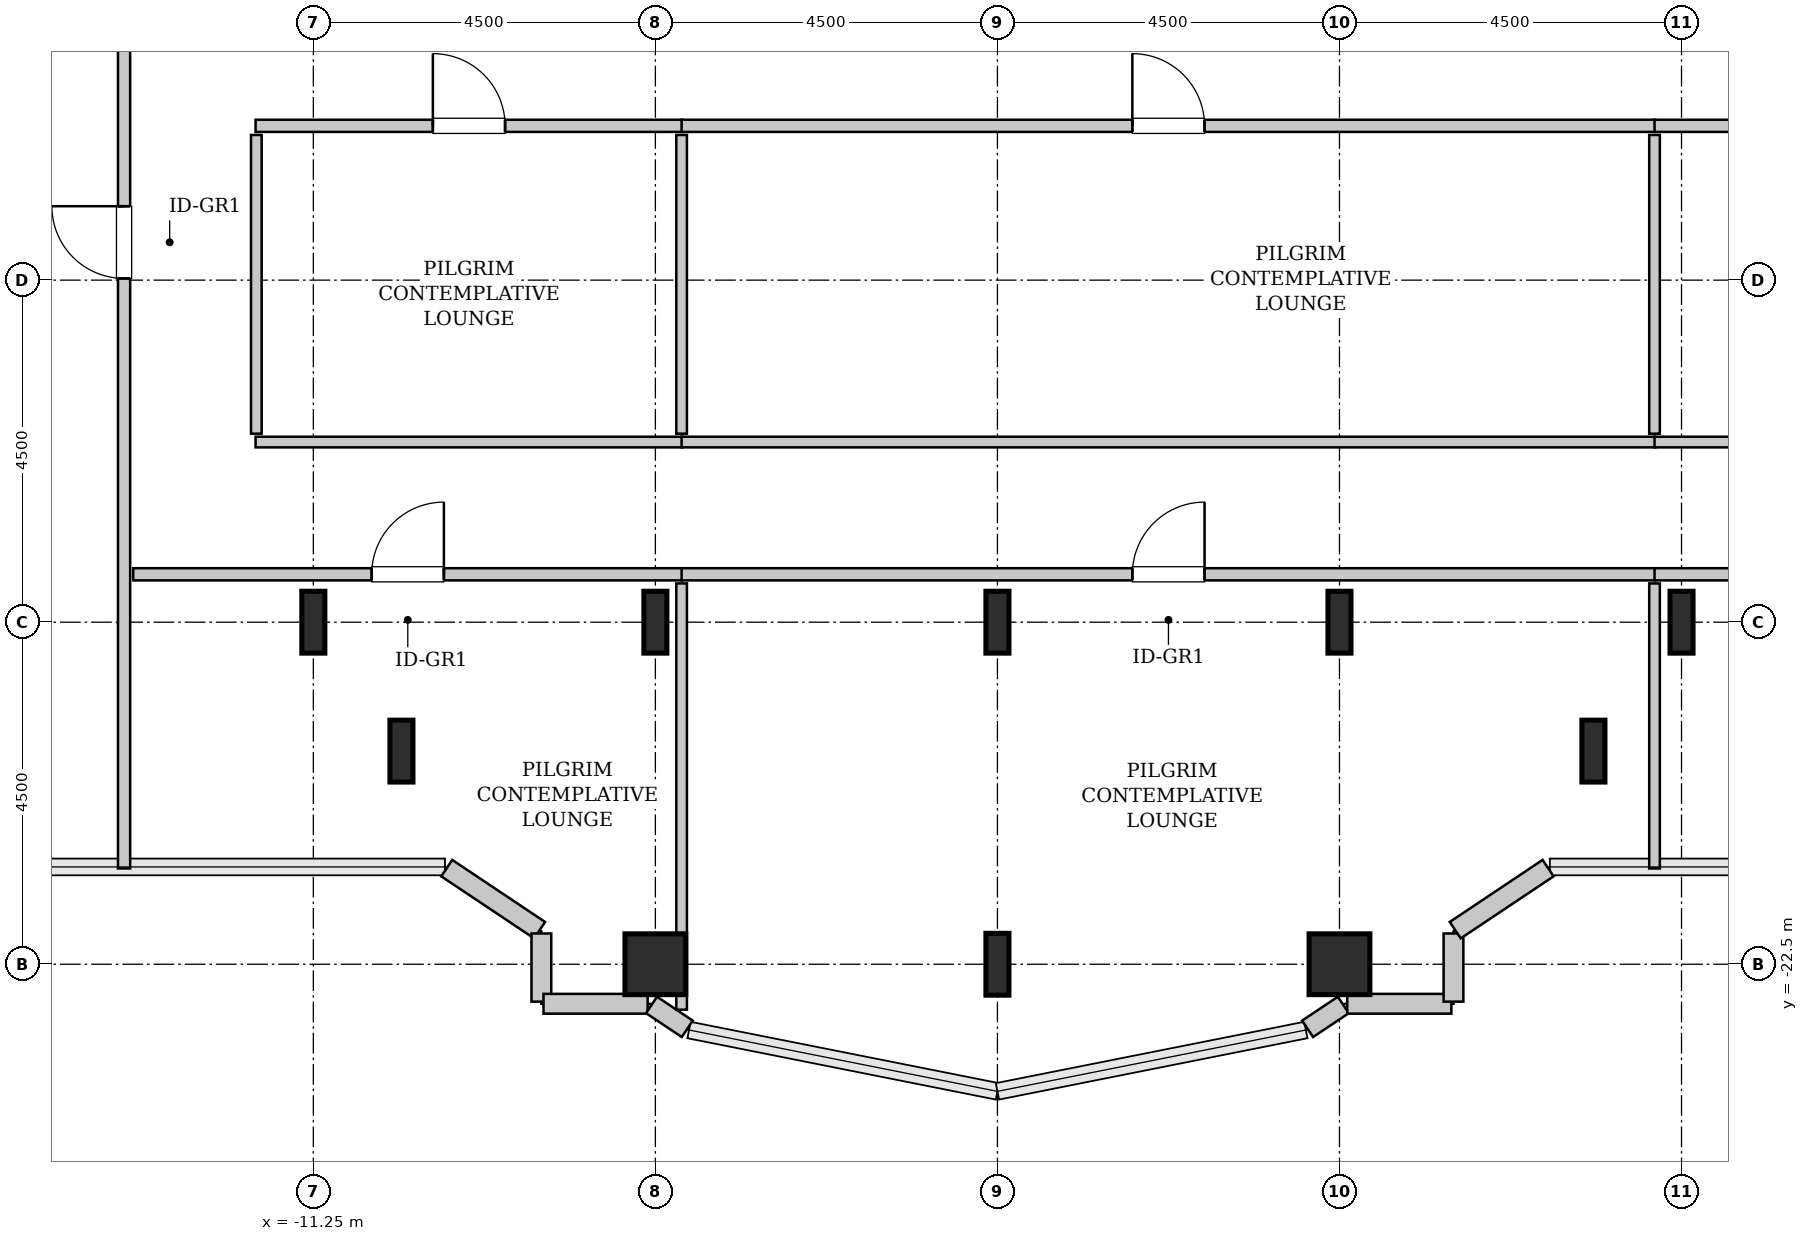
"""IFC4 building model, lengths in metres.
Left out: names, types, materials, properties, quantities, classifications, styles, units other than length and angle.
Written with IfcOpenShell. Run it as: python <this file> out.ifc"""

import sys

from ifc_helpers import new_model, si_unit, direction, frame, frame_2d, origin, origin_2d, place, context, subcontext, project, spatial, rectangle, hollow_rectangle, i_section, extrude, source, transform, mapped, element, fill, save


model = new_model("IFC4")
c1 = context("Model", 3, precision=1e-05, world=origin(), true_north=direction((0.0, 1.0)))
c2 = subcontext(c1, "Body", "Model", "MODEL_VIEW")
j1 = project(units=[si_unit("LENGTHUNIT", "METRE"), si_unit("PLANEANGLEUNIT", "RADIAN")], contexts=[c1])
p1 = place(None, origin())
s1 = spatial("IfcSite", under=j1, at=p1, CompositionType="ELEMENT")
p2 = place(p1, origin())
s2 = spatial("IfcBuilding", under=s1, at=p2, CompositionType="ELEMENT")
p3 = place(p2, frame((0.0, 0.0, 183.0)))
s3 = spatial("IfcBuildingStorey", under=s2, at=p3, CompositionType="ELEMENT", Elevation=183.0)
m1 = source(origin(), c2, "Body", "SweptSolid", [
    extrude(i_section(OverallWidth=0.303, OverallDepth=0.814, WebThickness=0.021, FlangeThickness=0.04, FilletRadius=0.03, at=origin_2d()), origin(), (0.0, 0.0, 1.0), 3.8),
])
for number, where, z_axis, x_axis in (
    (1, (-11.25, -18.0, 0.0), (0.0, 0.0, 1.0), (1.0, 0.0, 0.0)),
    (2, (-10.091, -19.696, 0.0), (0.0, 0.0, 1.0), (1.0, 0.0, 0.0)),
):
    element("IfcColumn", number, at=place(p3, frame(where, z_axis=z_axis, x_axis=x_axis)), inside=s3, PredefinedType="COLUMN", context=c2, shape_type="MappedRepresentation", body=[
        mapped(m1, transform((0.0, 0.0, 0.0), x_axis=(1.0, 0.0, 0.0), y_axis=(0.0, 1.0, 0.0), z_axis=(0.0, 0.0, 1.0), scale=1.0)),
    ])
m2 = source(origin(), c2, "Body", "SweptSolid", [
    extrude(hollow_rectangle(XDim=0.8, YDim=0.8, WallThickness=0.04, InnerFilletRadius=0.04, OuterFilletRadius=0.08, at=origin_2d()), origin(), (0.0, 0.0, 1.0), 3.8),
])
p4 = place(p3, frame((-6.75, -22.5, 0.0), z_axis=(0.0, 0.0, 1.0), x_axis=(1.0, 0.0, 0.0)))
e3 = element("IfcColumn", 3, at=p4, inside=s3, PredefinedType="COLUMN", context=c2, shape_type="MappedRepresentation", body=[
    mapped(m2, transform((0.0, 0.0, 0.0), x_axis=(1.0, 0.0, 0.0), y_axis=(0.0, 1.0, 0.0), z_axis=(0.0, 0.0, 1.0), scale=1.0)),
])
for number, where, z_axis, x_axis in (
    (4, (-6.75, -18.0, 0.0), (0.0, 0.0, 1.0), (1.0, 0.0, 0.0)),
    (5, (-2.25, -22.5, 0.0), (0.0, 0.0, 1.0), (1.0, 0.0, 0.0)),
    (6, (-2.25, -18.0, 0.0), (0.0, 0.0, 1.0), (1.0, 0.0, 0.0)),
):
    element("IfcColumn", number, at=place(p3, frame(where, z_axis=z_axis, x_axis=x_axis)), inside=s3, PredefinedType="COLUMN", context=c2, shape_type="MappedRepresentation", body=[
        mapped(m1, transform((0.0, 0.0, 0.0), x_axis=(1.0, 0.0, 0.0), y_axis=(0.0, 1.0, 0.0), z_axis=(0.0, 0.0, 1.0), scale=1.0)),
    ])
p5 = place(p3, frame((2.25, -22.5, 0.0), z_axis=(0.0, 0.0, 1.0), x_axis=(1.0, 0.0, 0.0)))
e7 = element("IfcColumn", 7, at=p5, inside=s3, PredefinedType="COLUMN", context=c2, shape_type="MappedRepresentation", body=[
    mapped(m2, transform((0.0, 0.0, 0.0), x_axis=(1.0, 0.0, 0.0), y_axis=(0.0, 1.0, 0.0), z_axis=(0.0, 0.0, 1.0), scale=1.0)),
])
for number, where, z_axis, x_axis in (
    (8, (2.25, -18.0, 0.0), (0.0, 0.0, 1.0), (1.0, 0.0, 0.0)),
    (9, (5.591, -19.696, 0.0), (0.0, 0.0, 1.0), (1.0, 0.0, 0.0)),
    (10, (6.75, -18.0, 0.0), (0.0, 0.0, 1.0), (1.0, 0.0, 0.0)),
):
    element("IfcColumn", number, at=place(p3, frame(where, z_axis=z_axis, x_axis=x_axis)), inside=s3, PredefinedType="COLUMN", context=c2, shape_type="MappedRepresentation", body=[
        mapped(m1, transform((0.0, 0.0, 0.0), x_axis=(1.0, 0.0, 0.0), y_axis=(0.0, 1.0, 0.0), z_axis=(0.0, 0.0, 1.0), scale=1.0)),
    ])
m3 = source(origin(), c2, "Body", "SweptSolid", [
    extrude(rectangle(XDim=1.469, YDim=0.26, at=frame_2d((0.734, 0.0))), origin(), (0.0, 0.0, 1.0), 3.55),
])
p6 = place(p3, frame((-9.495, -21.236, 0.0), z_axis=(0.0, 0.0, 1.0), x_axis=(0.831461760506, -0.555581983884, 0.0)))
e11 = element("IfcWall", 11, at=p6, inside=s3, PredefinedType="SOLIDWALL", context=c2, shape_type="MappedRepresentation", body=[
    mapped(m3, transform((0.0, 0.0, 0.0), x_axis=(1.0, 0.0, 0.0), y_axis=(0.0, 1.0, 0.0), z_axis=(0.0, 0.0, 1.0), scale=1.0)),
])
m4 = source(origin(), c2, "Body", "SweptSolid", [
    extrude(rectangle(XDim=0.897, YDim=0.26, at=frame_2d((0.448, 0.0))), origin(), (0.0, 0.0, 1.0), 3.55),
])
p7 = place(p3, frame((-8.25, -22.095, 0.0), z_axis=(0.0, 0.0, 1.0), x_axis=(0.0, -1.0, 0.0)))
e12 = element("IfcWall", 12, at=p7, inside=s3, PredefinedType="SOLIDWALL", context=c2, shape_type="MappedRepresentation", body=[
    mapped(m4, transform((0.0, 0.0, 0.0), x_axis=(1.0, 0.0, 0.0), y_axis=(0.0, 1.0, 0.0), z_axis=(0.0, 0.0, 1.0), scale=1.0)),
])
m5 = source(origin(), c2, "Body", "SweptSolid", [
    extrude(rectangle(XDim=1.37, YDim=0.26, at=frame_2d((0.685, 0.0))), origin(), (0.0, 0.0, 1.0), 3.55),
])
p8 = place(p3, frame((-8.222, -23.02, 0.0), z_axis=(0.0, 0.0, 1.0), x_axis=(1.0, 0.0, 0.0)))
e13 = element("IfcWall", 13, at=p8, inside=s3, PredefinedType="SOLIDWALL", context=c2, shape_type="MappedRepresentation", body=[
    mapped(m5, transform((0.0, 0.0, 0.0), x_axis=(1.0, 0.0, 0.0), y_axis=(0.0, 1.0, 0.0), z_axis=(0.0, 0.0, 1.0), scale=1.0)),
])
m6 = source(origin(), c2, "Body", "SweptSolid", [
    extrude(rectangle(XDim=0.565, YDim=0.26, at=frame_2d((0.283, 0.0))), origin(), (0.0, 0.0, 1.0), 3.55),
])
for number, where, z_axis, x_axis in (
    (14, (-6.801, -23.036, 0.0), (0.0, 0.0, 1.0), (0.832, -0.555, 0.0)),
    (15, (1.831, -23.35, 0.0), (0.0, 0.0, 1.0), (0.832, 0.555, 0.0)),
):
    element("IfcWall", number, at=place(p3, frame(where, z_axis=z_axis, x_axis=x_axis)), inside=s3, PredefinedType="SOLIDWALL", context=c2, shape_type="MappedRepresentation", body=[
        mapped(m6, transform((0.0, 0.0, 0.0), x_axis=(1.0, 0.0, 0.0), y_axis=(0.0, 1.0, 0.0), z_axis=(0.0, 0.0, 1.0), scale=1.0)),
    ])
p9 = place(p3, frame((2.352, -23.02, 0.0), z_axis=(0.0, 0.0, 1.0), x_axis=(1.0, 0.0, 0.0)))
e16 = element("IfcWall", 16, at=p9, inside=s3, PredefinedType="SOLIDWALL", context=c2, shape_type="MappedRepresentation", body=[
    mapped(m5, transform((0.0, 0.0, 0.0), x_axis=(1.0, 0.0, 0.0), y_axis=(0.0, 1.0, 0.0), z_axis=(0.0, 0.0, 1.0), scale=1.0)),
])
p10 = place(p3, frame((3.75, -22.992, 0.0), z_axis=(0.0, 0.0, 1.0), x_axis=(0.0, 1.0, 0.0)))
e17 = element("IfcWall", 17, at=p10, inside=s3, PredefinedType="SOLIDWALL", context=c2, shape_type="MappedRepresentation", body=[
    mapped(m4, transform((0.0, 0.0, 0.0), x_axis=(1.0, 0.0, 0.0), y_axis=(0.0, 1.0, 0.0), z_axis=(0.0, 0.0, 1.0), scale=1.0)),
])
p11 = place(p3, frame((3.773, -22.052, 0.0), z_axis=(0.0, 0.0, 1.0), x_axis=(0.831461760506, 0.555581983884, 0.0)))
e18 = element("IfcWall", 18, at=p11, inside=s3, PredefinedType="SOLIDWALL", context=c2, shape_type="MappedRepresentation", body=[
    mapped(m3, transform((0.0, 0.0, 0.0), x_axis=(1.0, 0.0, 0.0), y_axis=(0.0, 1.0, 0.0), z_axis=(0.0, 0.0, 1.0), scale=1.0)),
])
m7 = source(origin(), c2, "Body", "SweptSolid", [
    extrude(rectangle(XDim=12.645, YDim=0.16, at=frame_2d((6.323, 0.0))), origin(), (0.0, 0.0, 1.0), 3.535),
])
p12 = place(p3, frame((-13.74, -21.24, 0.0), z_axis=(0.0, 0.0, 1.0), x_axis=(0.0, 1.0, 0.0)))
e19 = element("IfcWall", 19, at=p12, inside=s3, PredefinedType="PARTITIONING", context=c2, shape_type="MappedRepresentation", body=[
    mapped(m7, transform((0.0, 0.0, 0.0), x_axis=(1.0, 0.0, 0.0), y_axis=(0.0, 1.0, 0.0), z_axis=(0.0, 0.0, 1.0), scale=1.0)),
])
p13 = place(p12, frame((7.762, 0.0, 0.0)))
e20 = element("IfcOpeningElement", 20, at=p13, cuts=e19, PredefinedType="OPENING", context=c2, shape_type="SweptSolid", body=[
    extrude(rectangle(XDim=0.95, YDim=2.1, at=frame_2d((0.475, 1.05))), frame((0.0, 0.09, 0.0), z_axis=(0.0, -1.0, 0.0), x_axis=(1.0, 0.0, 0.0)), (0.0, 0.0, 1.0), 0.18),
])
m8 = source(origin(), c2, "Body", "SweptSolid", [
    extrude(rectangle(XDim=7.225, YDim=0.16, at=frame_2d((3.613, 0.0))), origin(), (0.0, 0.0, 1.0), 3.535),
])
p14 = place(p3, frame((-13.62, -17.37, 0.0), z_axis=(0.0, 0.0, 1.0), x_axis=(1.0, 0.0, 0.0)))
e21 = element("IfcWall", 21, at=p14, inside=s3, PredefinedType="PARTITIONING", context=c2, shape_type="MappedRepresentation", body=[
    mapped(m8, transform((0.0, 0.0, 0.0), x_axis=(1.0, 0.0, 0.0), y_axis=(0.0, 1.0, 0.0), z_axis=(0.0, 0.0, 1.0), scale=1.0)),
])
p15 = place(p14, frame((3.137, 0.0, 0.0)))
e22 = element("IfcOpeningElement", 22, at=p15, cuts=e21, PredefinedType="OPENING", context=c2, shape_type="SweptSolid", body=[
    extrude(rectangle(XDim=0.95, YDim=2.1, at=frame_2d((0.475, 1.05))), frame((0.0, 0.09, 0.0), z_axis=(0.0, -1.0, 0.0), x_axis=(1.0, 0.0, 0.0)), (0.0, 0.0, 1.0), 0.18),
])
m9 = source(origin(), c2, "Body", "SweptSolid", [
    extrude(rectangle(XDim=5.608, YDim=0.14, at=frame_2d((2.804, 0.0))), origin(), (0.0, 0.0, 1.0), 2.875),
])
p16 = place(p3, frame((-6.405, -23.098, 0.0), z_axis=(0.0, 0.0, 1.0), x_axis=(0.0, 1.0, 0.0)))
e23 = element("IfcWall", 23, at=p16, inside=s3, PredefinedType="PARTITIONING", context=c2, shape_type="MappedRepresentation", body=[
    mapped(m9, transform((0.0, 0.0, 0.0), x_axis=(1.0, 0.0, 0.0), y_axis=(0.0, 1.0, 0.0), z_axis=(0.0, 0.0, 1.0), scale=1.0)),
])
m10 = source(origin(), c2, "Body", "SweptSolid", [
    extrude(rectangle(XDim=5.615, YDim=0.16, at=frame_2d((2.808, 0.0))), origin(), (0.0, 0.0, 1.0), 3.535),
])
p17 = place(p3, frame((-12.01, -11.47, 0.0), z_axis=(0.0, 0.0, 1.0), x_axis=(1.0, 0.0, 0.0)))
e24 = element("IfcWall", 24, at=p17, inside=s3, PredefinedType="PARTITIONING", context=c2, shape_type="MappedRepresentation", body=[
    mapped(m10, transform((0.0, 0.0, 0.0), x_axis=(1.0, 0.0, 0.0), y_axis=(0.0, 1.0, 0.0), z_axis=(0.0, 0.0, 1.0), scale=1.0)),
])
p18 = place(p17, frame((2.333, 0.0, 0.0)))
e25 = element("IfcOpeningElement", 25, at=p18, cuts=e24, PredefinedType="OPENING", context=c2, shape_type="SweptSolid", body=[
    extrude(rectangle(XDim=0.95, YDim=2.1, at=frame_2d((0.475, 1.05))), frame((0.0, 0.09, 0.0), z_axis=(0.0, -1.0, 0.0), x_axis=(1.0, 0.0, 0.0)), (0.0, 0.0, 1.0), 0.18),
])
m11 = source(origin(), c2, "Body", "SweptSolid", [
    extrude(rectangle(XDim=5.615, YDim=0.14, at=frame_2d((2.808, 0.0))), origin(), (0.0, 0.0, 1.0), 3.535),
])
p19 = place(p3, frame((-12.01, -15.63, 0.0), z_axis=(0.0, 0.0, 1.0), x_axis=(1.0, 0.0, 0.0)))
e26 = element("IfcWall", 26, at=p19, inside=s3, PredefinedType="PARTITIONING", context=c2, shape_type="MappedRepresentation", body=[
    mapped(m11, transform((0.0, 0.0, 0.0), x_axis=(1.0, 0.0, 0.0), y_axis=(0.0, 1.0, 0.0), z_axis=(0.0, 0.0, 1.0), scale=1.0)),
])
m12 = source(origin(), c2, "Body", "SweptSolid", [
    extrude(rectangle(XDim=3.93, YDim=0.14, at=frame_2d((1.965, 0.0))), origin(), (0.0, 0.0, 1.0), 3.535),
])
for number, where, z_axis, x_axis in (
    (27, (-12.0, -15.52, 0.0), (0.0, 0.0, 1.0), (0.0, 1.0, 0.0)),
    (28, (-6.405, -15.52, 0.0), (0.0, 0.0, 1.0), (0.0, 1.0, 0.0)),
):
    element("IfcWall", number, at=place(p3, frame(where, z_axis=z_axis, x_axis=x_axis)), inside=s3, PredefinedType="PARTITIONING", context=c2, shape_type="MappedRepresentation", body=[
        mapped(m12, transform((0.0, 0.0, 0.0), x_axis=(1.0, 0.0, 0.0), y_axis=(0.0, 1.0, 0.0), z_axis=(0.0, 0.0, 1.0), scale=1.0)),
    ])
m13 = source(origin(), c2, "Body", "SweptSolid", [
    extrude(rectangle(XDim=12.81, YDim=0.16, at=frame_2d((6.405, 0.0))), origin(), (0.0, 0.0, 1.0), 3.535),
])
p20 = place(p3, frame((-6.405, -17.37, 0.0), z_axis=(0.0, 0.0, 1.0), x_axis=(1.0, 0.0, 0.0)))
e29 = element("IfcWall", 29, at=p20, inside=s3, PredefinedType="PARTITIONING", context=c2, shape_type="MappedRepresentation", body=[
    mapped(m13, transform((0.0, 0.0, 0.0), x_axis=(1.0, 0.0, 0.0), y_axis=(0.0, 1.0, 0.0), z_axis=(0.0, 0.0, 1.0), scale=1.0)),
])
p21 = place(p20, frame((5.93, 0.0, 0.0)))
e30 = element("IfcOpeningElement", 30, at=p21, cuts=e29, PredefinedType="OPENING", context=c2, shape_type="SweptSolid", body=[
    extrude(rectangle(XDim=0.95, YDim=2.1, at=frame_2d((0.475, 1.05))), frame((0.0, 0.09, 0.0), z_axis=(0.0, -1.0, 0.0), x_axis=(1.0, 0.0, 0.0)), (0.0, 0.0, 1.0), 0.18),
])
m14 = source(origin(), c2, "Body", "SweptSolid", [
    extrude(rectangle(XDim=3.75, YDim=0.14, at=frame_2d((1.875, 0.0))), origin(), (0.0, 0.0, 1.0), 3.535),
])
p22 = place(p3, frame((6.395, -21.24, 0.0), z_axis=(0.0, 0.0, 1.0), x_axis=(0.0, 1.0, 0.0)))
e31 = element("IfcWall", 31, at=p22, inside=s3, PredefinedType="PARTITIONING", context=c2, shape_type="MappedRepresentation", body=[
    mapped(m14, transform((0.0, 0.0, 0.0), x_axis=(1.0, 0.0, 0.0), y_axis=(0.0, 1.0, 0.0), z_axis=(0.0, 0.0, 1.0), scale=1.0)),
])
p23 = place(p3, frame((-6.405, -11.47, 0.0), z_axis=(0.0, 0.0, 1.0), x_axis=(1.0, 0.0, 0.0)))
e32 = element("IfcWall", 32, at=p23, inside=s3, PredefinedType="PARTITIONING", context=c2, shape_type="MappedRepresentation", body=[
    mapped(m13, transform((0.0, 0.0, 0.0), x_axis=(1.0, 0.0, 0.0), y_axis=(0.0, 1.0, 0.0), z_axis=(0.0, 0.0, 1.0), scale=1.0)),
])
p24 = place(p23, frame((5.93, 0.0, 0.0)))
e33 = element("IfcOpeningElement", 33, at=p24, cuts=e32, PredefinedType="OPENING", context=c2, shape_type="SweptSolid", body=[
    extrude(rectangle(XDim=0.95, YDim=2.1, at=frame_2d((0.475, 1.05))), frame((0.0, 0.09, 0.0), z_axis=(0.0, -1.0, 0.0), x_axis=(1.0, 0.0, 0.0)), (0.0, 0.0, 1.0), 0.18),
])
m15 = source(origin(), c2, "Body", "SweptSolid", [
    extrude(rectangle(XDim=12.81, YDim=0.14, at=frame_2d((6.405, 0.0))), origin(), (0.0, 0.0, 1.0), 3.535),
])
p25 = place(p3, frame((-6.405, -15.63, 0.0), z_axis=(0.0, 0.0, 1.0), x_axis=(1.0, 0.0, 0.0)))
e34 = element("IfcWall", 34, at=p25, inside=s3, PredefinedType="PARTITIONING", context=c2, shape_type="MappedRepresentation", body=[
    mapped(m15, transform((0.0, 0.0, 0.0), x_axis=(1.0, 0.0, 0.0), y_axis=(0.0, 1.0, 0.0), z_axis=(0.0, 0.0, 1.0), scale=1.0)),
])
p26 = place(p3, frame((6.395, -15.52, 0.0), z_axis=(0.0, 0.0, 1.0), x_axis=(0.0, 1.0, 0.0)))
e35 = element("IfcWall", 35, at=p26, inside=s3, PredefinedType="PARTITIONING", context=c2, shape_type="MappedRepresentation", body=[
    mapped(m12, transform((0.0, 0.0, 0.0), x_axis=(1.0, 0.0, 0.0), y_axis=(0.0, 1.0, 0.0), z_axis=(0.0, 0.0, 1.0), scale=1.0)),
])
p27 = place(p3, frame((6.395, -17.37, 0.0), z_axis=(0.0, 0.0, 1.0), x_axis=(1.0, 0.0, 0.0)))
e36 = element("IfcWall", 36, at=p27, inside=s3, PredefinedType="PARTITIONING", context=c2, shape_type="MappedRepresentation", body=[
    mapped(m8, transform((0.0, 0.0, 0.0), x_axis=(1.0, 0.0, 0.0), y_axis=(0.0, 1.0, 0.0), z_axis=(0.0, 0.0, 1.0), scale=1.0)),
])
p28 = place(p27, frame((3.137, 0.0, 0.0)))
e37 = element("IfcOpeningElement", 37, at=p28, cuts=e36, PredefinedType="OPENING", context=c2, shape_type="SweptSolid", body=[
    extrude(rectangle(XDim=0.95, YDim=2.1, at=frame_2d((0.475, 1.05))), frame((0.0, 0.09, 0.0), z_axis=(0.0, -1.0, 0.0), x_axis=(1.0, 0.0, 0.0)), (0.0, 0.0, 1.0), 0.18),
])
p29 = place(p3, frame((6.395, -11.47, 0.0), z_axis=(0.0, 0.0, 1.0), x_axis=(1.0, 0.0, 0.0)))
e38 = element("IfcWall", 38, at=p29, inside=s3, PredefinedType="PARTITIONING", context=c2, shape_type="MappedRepresentation", body=[
    mapped(m10, transform((0.0, 0.0, 0.0), x_axis=(1.0, 0.0, 0.0), y_axis=(0.0, 1.0, 0.0), z_axis=(0.0, 0.0, 1.0), scale=1.0)),
])
p30 = place(p29, frame((2.333, 0.0, 0.0)))
e39 = element("IfcOpeningElement", 39, at=p30, cuts=e38, PredefinedType="OPENING", context=c2, shape_type="SweptSolid", body=[
    extrude(rectangle(XDim=0.95, YDim=2.1, at=frame_2d((0.475, 1.05))), frame((0.0, 0.09, 0.0), z_axis=(0.0, -1.0, 0.0), x_axis=(1.0, 0.0, 0.0)), (0.0, 0.0, 1.0), 0.18),
])
p31 = place(p3, frame((6.395, -15.63, 0.0), z_axis=(0.0, 0.0, 1.0), x_axis=(1.0, 0.0, 0.0)))
e40 = element("IfcWall", 40, at=p31, inside=s3, PredefinedType="PARTITIONING", context=c2, shape_type="MappedRepresentation", body=[
    mapped(m11, transform((0.0, 0.0, 0.0), x_axis=(1.0, 0.0, 0.0), y_axis=(0.0, 1.0, 0.0), z_axis=(0.0, 0.0, 1.0), scale=1.0)),
])
m16 = source(origin(), c2, "Body", "SweptSolid", [
    extrude(rectangle(XDim=0.95, YDim=2.1, at=frame_2d((0.475, 1.05))), frame((0.0, 0.025, 0.0), z_axis=(0.0, -1.0, 0.0), x_axis=(1.0, 0.0, 0.0)), (0.0, 0.0, 1.0), 0.05),
])
p32 = place(p13, origin())
e41 = element("IfcDoor", 41, at=p32, inside=s3, OperationType="SINGLE_SWING_RIGHT", PredefinedType="DOOR", context=c2, shape_type="MappedRepresentation", body=[
    mapped(m16, transform((0.0, 0.0, 0.0), x_axis=(1.0, 0.0, 0.0), y_axis=(0.0, 1.0, 0.0), z_axis=(0.0, 0.0, 1.0), scale=1.0)),
])
fill(e20, e41)
p33 = place(p15, origin())
e42 = element("IfcDoor", 42, at=p33, inside=s3, OperationType="SINGLE_SWING_RIGHT", PredefinedType="DOOR", context=c2, shape_type="MappedRepresentation", body=[
    mapped(m16, transform((0.0, 0.0, 0.0), x_axis=(1.0, 0.0, 0.0), y_axis=(0.0, 1.0, 0.0), z_axis=(0.0, 0.0, 1.0), scale=1.0)),
])
fill(e22, e42)
p34 = place(p18, origin())
e43 = element("IfcDoor", 43, at=p34, inside=s3, OperationType="SINGLE_SWING_LEFT", PredefinedType="DOOR", context=c2, shape_type="MappedRepresentation", body=[
    mapped(m16, transform((0.0, 0.0, 0.0), x_axis=(1.0, 0.0, 0.0), y_axis=(0.0, 1.0, 0.0), z_axis=(0.0, 0.0, 1.0), scale=1.0)),
])
fill(e25, e43)
p35 = place(p21, origin())
e44 = element("IfcDoor", 44, at=p35, inside=s3, OperationType="SINGLE_SWING_RIGHT", PredefinedType="DOOR", context=c2, shape_type="MappedRepresentation", body=[
    mapped(m16, transform((0.0, 0.0, 0.0), x_axis=(1.0, 0.0, 0.0), y_axis=(0.0, 1.0, 0.0), z_axis=(0.0, 0.0, 1.0), scale=1.0)),
])
fill(e30, e44)
p36 = place(p24, origin())
e45 = element("IfcDoor", 45, at=p36, inside=s3, OperationType="SINGLE_SWING_LEFT", PredefinedType="DOOR", context=c2, shape_type="MappedRepresentation", body=[
    mapped(m16, transform((0.0, 0.0, 0.0), x_axis=(1.0, 0.0, 0.0), y_axis=(0.0, 1.0, 0.0), z_axis=(0.0, 0.0, 1.0), scale=1.0)),
])
fill(e33, e45)
save(model, sys.argv[1])
